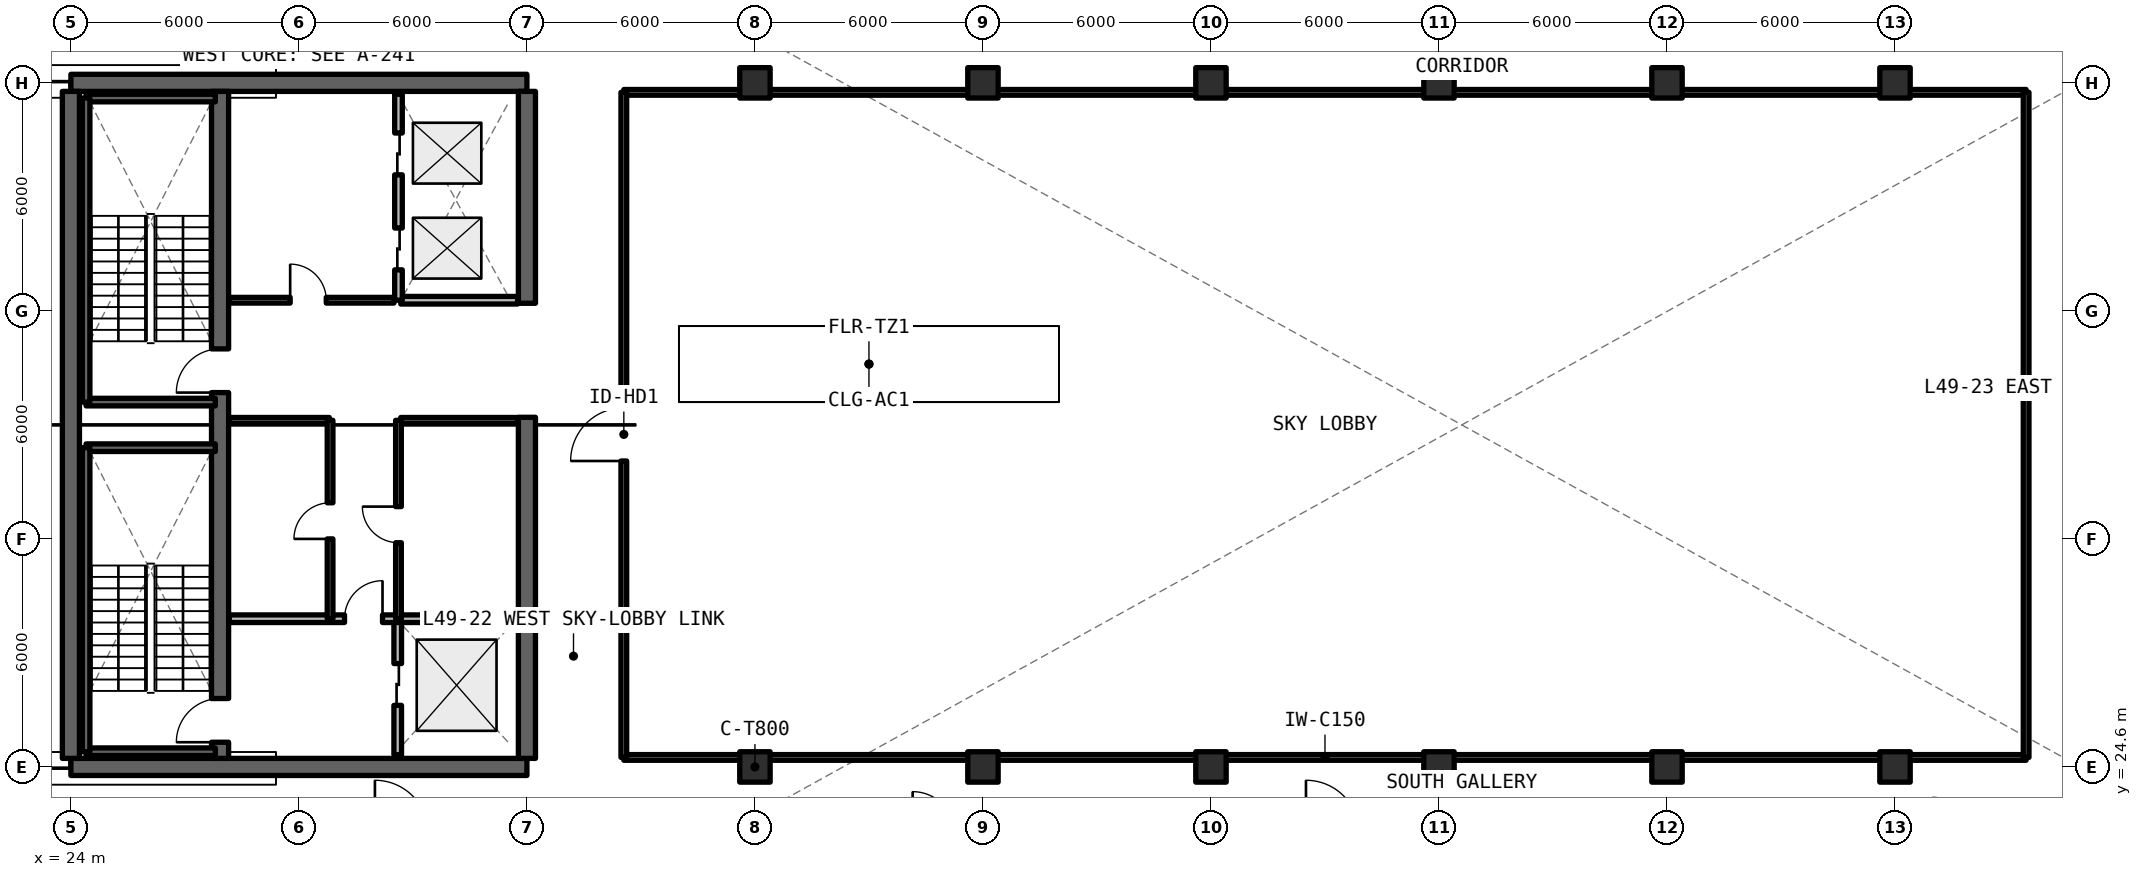
"""IFC4 building model, lengths in metres.
Left out: names, types, materials, properties, quantities, classifications, styles, units other than length and angle.
Written with IfcOpenShell. Run it as: python <this file> out.ifc"""

import sys

from ifc_helpers import new_model, si_unit, direction, frame, frame_2d, origin, origin_2d, place, context, subcontext, project, spatial, rectangle, extrude, element, fill, save


model = new_model("IFC4")
c1 = context("Model", 3, precision=1e-05, world=origin(), true_north=direction((0.0, 1.0)))
c2 = subcontext(c1, "Body", "Model", "MODEL_VIEW")
j1 = project(units=[si_unit("LENGTHUNIT", "METRE"), si_unit("PLANEANGLEUNIT", "RADIAN")], contexts=[c1])
p1 = place(None, origin())
s1 = spatial("IfcSite", under=j1, at=p1, CompositionType="ELEMENT")
p2 = place(p1, origin())
s2 = spatial("IfcBuilding", under=s1, at=p2, CompositionType="ELEMENT")
p3 = place(p2, frame((0.0, 0.0, 177.87)))
s3 = spatial("IfcBuildingStorey", under=s2, at=p3, CompositionType="ELEMENT", Elevation=177.87)
for number, where, z_axis, x_axis in (
    (1, (24.0, 24.6, 0.0), (0.0, 0.0, 1.0), (1.0, 0.0, 0.0)),
    (2, (36.0, 42.6, 0.0), (0.0, 0.0, 1.0), (-1.0, 0.0, 0.0)),
):
    element("IfcWall", number, at=place(p3, frame(where, z_axis=z_axis, x_axis=x_axis)), inside=s3, PredefinedType="SHEAR", context=c2, shape_type="SweptSolid", body=[
        extrude(rectangle(XDim=12.0, YDim=0.45, at=frame_2d((6.0, 0.0))), origin(), (0.0, 0.0, 1.0), 3.96),
    ])
p4 = place(p3, frame((24.0, 24.825, 0.0), z_axis=(0.0, 0.0, 1.0), x_axis=(0.0, 1.0, 0.0)))
e3 = element("IfcWall", 3, at=p4, inside=s3, PredefinedType="SHEAR", context=c2, shape_type="SweptSolid", body=[
    extrude(rectangle(XDim=17.55, YDim=0.45, at=frame_2d((8.775, 0.0))), origin(), (0.0, 0.0, 1.0), 3.96),
])
p5 = place(p3, frame((36.0, 24.825, 0.0), z_axis=(0.0, 0.0, 1.0), x_axis=(0.0, 1.0, 0.0)))
e4 = element("IfcWall", 4, at=p5, inside=s3, PredefinedType="SHEAR", context=c2, shape_type="SweptSolid", body=[
    extrude(rectangle(XDim=8.975, YDim=0.45, at=frame_2d((4.488, 0.0))), origin(), (0.0, 0.0, 1.0), 3.96),
])
p6 = place(p3, frame((36.0, 36.8, 0.0), z_axis=(0.0, 0.0, 1.0), x_axis=(0.0, 1.0, 0.0)))
e5 = element("IfcWall", 5, at=p6, inside=s3, PredefinedType="SHEAR", context=c2, shape_type="SweptSolid", body=[
    extrude(rectangle(XDim=5.575, YDim=0.45, at=frame_2d((2.788, 0.0))), origin(), (0.0, 0.0, 1.0), 3.96),
])
p7 = place(p3, frame((27.925, 24.825, 0.0), z_axis=(0.0, 0.0, 1.0), x_axis=(0.0, 1.0, 0.0)))
e6 = element("IfcWall", 6, at=p7, inside=s3, PredefinedType="SHEAR", context=c2, shape_type="SweptSolid", body=[
    extrude(rectangle(XDim=17.55, YDim=0.45, at=frame_2d((8.775, 0.0))), origin(), (0.0, 0.0, 1.0), 3.96),
])
p8 = place(p7, frame((0.425, 0.0, 0.0)))
e7 = element("IfcOpeningElement", 7, at=p8, cuts=e6, PredefinedType="OPENING", context=c2, shape_type="SweptSolid", body=[
    extrude(rectangle(XDim=1.15, YDim=2.15, at=frame_2d((0.575, 1.075))), frame((0.0, 0.235, 0.0), z_axis=(0.0, -1.0, 0.0), x_axis=(1.0, 0.0, 0.0)), (0.0, 0.0, 1.0), 0.47),
])
p9 = place(p7, frame((9.625, 0.0, 0.0)))
e8 = element("IfcOpeningElement", 8, at=p9, cuts=e6, PredefinedType="OPENING", context=c2, shape_type="SweptSolid", body=[
    extrude(rectangle(XDim=1.15, YDim=2.15, at=frame_2d((0.575, 1.075))), frame((0.0, 0.235, 0.0), z_axis=(0.0, -1.0, 0.0), x_axis=(1.0, 0.0, 0.0)), (0.0, 0.0, 1.0), 0.47),
])
for number, where, z_axis, x_axis in (
    (9, (42.0, 24.6, 0.0), (0.0, 0.0, 1.0), (1.0, 0.0, 0.0)),
    (10, (42.0, 42.6, 0.0), (0.0, 0.0, 1.0), (1.0, 0.0, 0.0)),
    (11, (48.0, 24.6, 0.0), (0.0, 0.0, 1.0), (1.0, 0.0, 0.0)),
    (12, (48.0, 42.6, 0.0), (0.0, 0.0, 1.0), (1.0, 0.0, 0.0)),
    (13, (54.0, 24.6, 0.0), (0.0, 0.0, 1.0), (1.0, 0.0, 0.0)),
    (14, (54.0, 42.6, 0.0), (0.0, 0.0, 1.0), (1.0, 0.0, 0.0)),
    (15, (60.0, 24.6, 0.0), (0.0, 0.0, 1.0), (1.0, 0.0, 0.0)),
    (16, (60.0, 42.6, 0.0), (0.0, 0.0, 1.0), (1.0, 0.0, 0.0)),
    (17, (66.0, 24.6, 0.0), (0.0, 0.0, 1.0), (1.0, 0.0, 0.0)),
    (18, (66.0, 42.6, 0.0), (0.0, 0.0, 1.0), (1.0, 0.0, 0.0)),
    (19, (72.0, 24.6, 0.0), (0.0, 0.0, 1.0), (1.0, 0.0, 0.0)),
    (20, (72.0, 42.6, 0.0), (0.0, 0.0, 1.0), (1.0, 0.0, 0.0)),
):
    element("IfcColumn", number, at=place(p3, frame(where, z_axis=z_axis, x_axis=x_axis)), inside=s3, PredefinedType="COLUMN", context=c2, shape_type="SweptSolid", body=[
        extrude(rectangle(XDim=0.8, YDim=0.8, at=origin_2d()), origin(), (0.0, 0.0, 1.0), 3.96),
    ])
p10 = place(p3, frame((32.6, 24.92, 0.0), z_axis=(0.0, 0.0, 1.0), x_axis=(0.0, 1.0, 0.0)))
e21 = element("IfcWall", 21, at=p10, inside=s3, PredefinedType="SOLIDWALL", context=c2, shape_type="SweptSolid", body=[
    extrude(rectangle(XDim=3.58, YDim=0.2, at=frame_2d((1.79, 0.0))), origin(), (0.0, 0.0, 1.0), 2.96),
])
p11 = place(p10, frame((1.3, 0.0, 0.0)))
e22 = element("IfcOpeningElement", 22, at=p11, cuts=e21, PredefinedType="OPENING", context=c2, shape_type="SweptSolid", body=[
    extrude(rectangle(XDim=1.1, YDim=2.2, at=frame_2d((0.55, 1.1))), frame((0.0, 0.11, 0.0), z_axis=(0.0, -1.0, 0.0), x_axis=(1.0, 0.0, 0.0)), (0.0, 0.0, 1.0), 0.22),
])
p12 = place(p3, frame((28.17, 28.5, 0.0), z_axis=(0.0, 0.0, 1.0), x_axis=(1.0, 0.0, 0.0)))
e23 = element("IfcWall", 23, at=p12, inside=s3, PredefinedType="SOLIDWALL", context=c2, shape_type="SweptSolid", body=[
    extrude(rectangle(XDim=7.585, YDim=0.2, at=frame_2d((3.792, 0.0))), origin(), (0.0, 0.0, 1.0), 2.96),
])
p13 = place(p12, frame((3.03, 0.0, 0.0)))
e24 = element("IfcOpeningElement", 24, at=p13, cuts=e23, PredefinedType="OPENING", context=c2, shape_type="SweptSolid", body=[
    extrude(rectangle(XDim=1.0, YDim=2.15, at=frame_2d((0.5, 1.075))), frame((0.0, 0.11, 0.0), z_axis=(0.0, -1.0, 0.0), x_axis=(1.0, 0.0, 0.0)), (0.0, 0.0, 1.0), 0.22),
])
p14 = place(p3, frame((28.17, 33.72, 0.0), z_axis=(0.0, 0.0, 1.0), x_axis=(1.0, 0.0, 0.0)))
e25 = element("IfcWall", 25, at=p14, inside=s3, PredefinedType="SOLIDWALL", context=c2, shape_type="SweptSolid", body=[
    extrude(rectangle(XDim=2.63, YDim=0.15, at=frame_2d((1.315, 0.0))), origin(), (0.0, 0.0, 1.0), 2.96),
])
p15 = place(p3, frame((30.82, 28.5, 0.0), z_axis=(0.0, 0.0, 1.0), x_axis=(0.0, 1.0, 0.0)))
e26 = element("IfcWall", 26, at=p15, inside=s3, PredefinedType="SOLIDWALL", context=c2, shape_type="SweptSolid", body=[
    extrude(rectangle(XDim=5.22, YDim=0.15, at=frame_2d((2.61, 0.0))), origin(), (0.0, 0.0, 1.0), 2.96),
])
p16 = place(p15, frame((2.1, 0.0, 0.0)))
e27 = element("IfcOpeningElement", 27, at=p16, cuts=e26, PredefinedType="OPENING", context=c2, shape_type="SweptSolid", body=[
    extrude(rectangle(XDim=0.95, YDim=2.15, at=frame_2d((0.475, 1.075))), frame((0.0, 0.085, 0.0), z_axis=(0.0, -1.0, 0.0), x_axis=(1.0, 0.0, 0.0)), (0.0, 0.0, 1.0), 0.17),
])
p17 = place(p3, frame((32.68, 33.72, 0.0), z_axis=(0.0, 0.0, 1.0), x_axis=(1.0, 0.0, 0.0)))
e28 = element("IfcWall", 28, at=p17, inside=s3, PredefinedType="SOLIDWALL", context=c2, shape_type="SweptSolid", body=[
    extrude(rectangle(XDim=3.075, YDim=0.15, at=frame_2d((1.538, 0.0))), origin(), (0.0, 0.0, 1.0), 2.96),
])
p18 = place(p3, frame((32.62, 28.5, 0.0), z_axis=(0.0, 0.0, 1.0), x_axis=(0.0, 1.0, 0.0)))
e29 = element("IfcWall", 29, at=p18, inside=s3, PredefinedType="SOLIDWALL", context=c2, shape_type="SweptSolid", body=[
    extrude(rectangle(XDim=5.22, YDim=0.15, at=frame_2d((2.61, 0.0))), origin(), (0.0, 0.0, 1.0), 2.96),
])
p19 = place(p18, frame((2.0, 0.0, 0.0)))
e30 = element("IfcOpeningElement", 30, at=p19, cuts=e29, PredefinedType="OPENING", context=c2, shape_type="SweptSolid", body=[
    extrude(rectangle(XDim=0.95, YDim=2.15, at=frame_2d((0.475, 1.075))), frame((0.0, 0.085, 0.0), z_axis=(0.0, -1.0, 0.0), x_axis=(1.0, 0.0, 0.0)), (0.0, 0.0, 1.0), 0.17),
])
p20 = place(p3, frame((28.17, 36.88, 0.0), z_axis=(0.0, 0.0, 1.0), x_axis=(1.0, 0.0, 0.0)))
e31 = element("IfcWall", 31, at=p20, inside=s3, PredefinedType="SOLIDWALL", context=c2, shape_type="SweptSolid", body=[
    extrude(rectangle(XDim=4.33, YDim=0.15, at=frame_2d((2.165, 0.0))), origin(), (0.0, 0.0, 1.0), 2.96),
])
p21 = place(p20, frame((1.6, 0.0, 0.0)))
e32 = element("IfcOpeningElement", 32, at=p21, cuts=e31, PredefinedType="OPENING", context=c2, shape_type="SweptSolid", body=[
    extrude(rectangle(XDim=0.95, YDim=2.15, at=frame_2d((0.475, 1.075))), frame((0.0, 0.085, 0.0), z_axis=(0.0, -1.0, 0.0), x_axis=(1.0, 0.0, 0.0)), (0.0, 0.0, 1.0), 0.17),
])
p22 = place(p3, frame((32.68, 36.88, 0.0), z_axis=(0.0, 0.0, 1.0), x_axis=(1.0, 0.0, 0.0)))
e33 = element("IfcWall", 33, at=p22, inside=s3, PredefinedType="SOLIDWALL", context=c2, shape_type="SweptSolid", body=[
    extrude(rectangle(XDim=3.075, YDim=0.2, at=frame_2d((1.538, 0.0))), origin(), (0.0, 0.0, 1.0), 2.96),
])
p23 = place(p3, frame((32.62, 36.88, 0.0), z_axis=(0.0, 0.0, 1.0), x_axis=(0.0, 1.0, 0.0)))
e34 = element("IfcWall", 34, at=p23, inside=s3, PredefinedType="SOLIDWALL", context=c2, shape_type="SweptSolid", body=[
    extrude(rectangle(XDim=5.42, YDim=0.2, at=frame_2d((2.71, 0.0))), origin(), (0.0, 0.0, 1.0), 2.96),
])
p24 = place(p23, frame((0.8, 0.0, 0.0)))
e35 = element("IfcOpeningElement", 35, at=p24, cuts=e34, PredefinedType="OPENING", context=c2, shape_type="SweptSolid", body=[
    extrude(rectangle(XDim=1.1, YDim=2.2, at=frame_2d((0.55, 1.1))), frame((0.0, 0.11, 0.0), z_axis=(0.0, -1.0, 0.0), x_axis=(1.0, 0.0, 0.0)), (0.0, 0.0, 1.0), 0.22),
])
p25 = place(p23, frame((3.3, 0.0, 0.0)))
e36 = element("IfcOpeningElement", 36, at=p25, cuts=e34, PredefinedType="OPENING", context=c2, shape_type="SweptSolid", body=[
    extrude(rectangle(XDim=1.1, YDim=2.2, at=frame_2d((0.55, 1.1))), frame((0.0, 0.11, 0.0), z_axis=(0.0, -1.0, 0.0), x_axis=(1.0, 0.0, 0.0)), (0.0, 0.0, 1.0), 0.22),
])
for number, where, z_axis, x_axis in (
    (37, (38.55, 24.85, 0.0), (0.0, 0.0, 1.0), (1.0, 0.0, 0.0)),
    (38, (38.55, 42.35, 0.0), (0.0, 0.0, 1.0), (1.0, 0.0, 0.0)),
):
    element("IfcWall", number, at=place(p3, frame(where, z_axis=z_axis, x_axis=x_axis)), inside=s3, PredefinedType="SOLIDWALL", context=c2, shape_type="SweptSolid", body=[
        extrude(rectangle(XDim=36.9, YDim=0.15, at=frame_2d((18.45, 0.0))), origin(), (0.0, 0.0, 1.0), 2.96),
    ])
p26 = place(p3, frame((38.55, 24.85, 0.0), z_axis=(0.0, 0.0, 1.0), x_axis=(0.0, 1.0, 0.0)))
e39 = element("IfcWall", 39, at=p26, inside=s3, PredefinedType="SOLIDWALL", context=c2, shape_type="SweptSolid", body=[
    extrude(rectangle(XDim=17.5, YDim=0.15, at=frame_2d((8.75, 0.0))), origin(), (0.0, 0.0, 1.0), 2.96),
])
p27 = place(p26, frame((7.8, 0.0, 0.0)))
e40 = element("IfcOpeningElement", 40, at=p27, cuts=e39, PredefinedType="OPENING", context=c2, shape_type="SweptSolid", body=[
    extrude(rectangle(XDim=1.4, YDim=2.15, at=frame_2d((0.7, 1.075))), frame((0.0, 0.085, 0.0), z_axis=(0.0, -1.0, 0.0), x_axis=(1.0, 0.0, 0.0)), (0.0, 0.0, 1.0), 0.17),
])
p28 = place(p3, frame((75.45, 24.85, 0.0), z_axis=(0.0, 0.0, 1.0), x_axis=(0.0, 1.0, 0.0)))
e41 = element("IfcWall", 41, at=p28, inside=s3, PredefinedType="SOLIDWALL", context=c2, shape_type="SweptSolid", body=[
    extrude(rectangle(XDim=17.5, YDim=0.15, at=frame_2d((8.75, 0.0))), origin(), (0.0, 0.0, 1.0), 2.96),
])
for number, where, z_axis, x_axis in (
    (42, (24.4, 25.0, 0.0), (0.0, 0.0, 1.0), (1.0, 0.0, 0.0)),
    (43, (27.8, 33.0, 0.0), (0.0, 0.0, 1.0), (-1.0, 0.0, 0.0)),
):
    element("IfcWall", number, at=place(p3, frame(where, z_axis=z_axis, x_axis=x_axis)), inside=s3, PredefinedType="SOLIDWALL", context=c2, shape_type="SweptSolid", body=[
        extrude(rectangle(XDim=3.4, YDim=0.2, at=frame_2d((1.7, 0.0))), origin(), (0.0, 0.0, 1.0), 3.96),
    ])
p29 = place(p3, frame((24.4, 33.0, 0.0), z_axis=(0.0, 0.0, 1.0), x_axis=(0.0, -1.0, 0.0)))
e44 = element("IfcWall", 44, at=p29, inside=s3, PredefinedType="SOLIDWALL", context=c2, shape_type="SweptSolid", body=[
    extrude(rectangle(XDim=8.0, YDim=0.2, at=frame_2d((4.0, 0.0))), origin(), (0.0, 0.0, 1.0), 3.96),
])
for number, where, z_axis, x_axis in (
    (45, (24.4, 34.2, 0.0), (0.0, 0.0, 1.0), (1.0, 0.0, 0.0)),
    (46, (27.8, 42.2, 0.0), (0.0, 0.0, 1.0), (-1.0, 0.0, 0.0)),
):
    element("IfcWall", number, at=place(p3, frame(where, z_axis=z_axis, x_axis=x_axis)), inside=s3, PredefinedType="SOLIDWALL", context=c2, shape_type="SweptSolid", body=[
        extrude(rectangle(XDim=3.4, YDim=0.2, at=frame_2d((1.7, 0.0))), origin(), (0.0, 0.0, 1.0), 3.96),
    ])
p30 = place(p3, frame((24.4, 42.2, 0.0), z_axis=(0.0, 0.0, 1.0), x_axis=(0.0, -1.0, 0.0)))
e47 = element("IfcWall", 47, at=p30, inside=s3, PredefinedType="SOLIDWALL", context=c2, shape_type="SweptSolid", body=[
    extrude(rectangle(XDim=8.0, YDim=0.2, at=frame_2d((4.0, 0.0))), origin(), (0.0, 0.0, 1.0), 3.96),
])
p31 = place(p11, origin())
e48 = element("IfcDoor", 48, at=p31, inside=s3, OperationType="SLIDING_TO_LEFT", PredefinedType="DOOR", context=c2, shape_type="SweptSolid", body=[
    extrude(rectangle(XDim=1.1, YDim=2.2, at=frame_2d((0.55, 1.1))), frame((0.0, 0.025, 0.0), z_axis=(0.0, -1.0, 0.0), x_axis=(1.0, 0.0, 0.0)), (0.0, 0.0, 1.0), 0.05),
])
fill(e22, e48)
p32 = place(p13, origin())
e49 = element("IfcDoor", 49, at=p32, inside=s3, OperationType="SINGLE_SWING_RIGHT", PredefinedType="DOOR", context=c2, shape_type="SweptSolid", body=[
    extrude(rectangle(XDim=1.0, YDim=2.15, at=frame_2d((0.5, 1.075))), frame((0.0, 0.025, 0.0), z_axis=(0.0, -1.0, 0.0), x_axis=(1.0, 0.0, 0.0)), (0.0, 0.0, 1.0), 0.05),
])
fill(e24, e49)
p33 = place(p16, origin())
e50 = element("IfcDoor", 50, at=p33, inside=s3, OperationType="SINGLE_SWING_LEFT", PredefinedType="DOOR", context=c2, shape_type="SweptSolid", body=[
    extrude(rectangle(XDim=0.95, YDim=2.15, at=frame_2d((0.475, 1.075))), frame((0.0, 0.025, 0.0), z_axis=(0.0, -1.0, 0.0), x_axis=(1.0, 0.0, 0.0)), (0.0, 0.0, 1.0), 0.05),
])
fill(e27, e50)
p34 = place(p19, origin())
e51 = element("IfcDoor", 51, at=p34, inside=s3, OperationType="SINGLE_SWING_RIGHT", PredefinedType="DOOR", context=c2, shape_type="SweptSolid", body=[
    extrude(rectangle(XDim=0.95, YDim=2.15, at=frame_2d((0.475, 1.075))), frame((0.0, 0.025, 0.0), z_axis=(0.0, -1.0, 0.0), x_axis=(1.0, 0.0, 0.0)), (0.0, 0.0, 1.0), 0.05),
])
fill(e30, e51)
p35 = place(p21, origin())
e52 = element("IfcDoor", 52, at=p35, inside=s3, OperationType="SINGLE_SWING_LEFT", PredefinedType="DOOR", context=c2, shape_type="SweptSolid", body=[
    extrude(rectangle(XDim=0.95, YDim=2.15, at=frame_2d((0.475, 1.075))), frame((0.0, 0.025, 0.0), z_axis=(0.0, -1.0, 0.0), x_axis=(1.0, 0.0, 0.0)), (0.0, 0.0, 1.0), 0.05),
])
fill(e32, e52)
p36 = place(p24, origin())
e53 = element("IfcDoor", 53, at=p36, inside=s3, OperationType="SLIDING_TO_LEFT", PredefinedType="DOOR", context=c2, shape_type="SweptSolid", body=[
    extrude(rectangle(XDim=1.1, YDim=2.2, at=frame_2d((0.55, 1.1))), frame((0.0, 0.025, 0.0), z_axis=(0.0, -1.0, 0.0), x_axis=(1.0, 0.0, 0.0)), (0.0, 0.0, 1.0), 0.05),
])
fill(e35, e53)
p37 = place(p25, origin())
e54 = element("IfcDoor", 54, at=p37, inside=s3, OperationType="SLIDING_TO_RIGHT", PredefinedType="DOOR", context=c2, shape_type="SweptSolid", body=[
    extrude(rectangle(XDim=1.1, YDim=2.2, at=frame_2d((0.55, 1.1))), frame((0.0, 0.025, 0.0), z_axis=(0.0, -1.0, 0.0), x_axis=(1.0, 0.0, 0.0)), (0.0, 0.0, 1.0), 0.05),
])
fill(e36, e54)
p38 = place(p27, origin())
e55 = element("IfcDoor", 55, at=p38, inside=s3, OperationType="SINGLE_SWING_LEFT", PredefinedType="DOOR", context=c2, shape_type="SweptSolid", body=[
    extrude(rectangle(XDim=1.4, YDim=2.15, at=frame_2d((0.7, 1.075))), frame((0.0, 0.025, 0.0), z_axis=(0.0, -1.0, 0.0), x_axis=(1.0, 0.0, 0.0)), (0.0, 0.0, 1.0), 0.05),
])
fill(e40, e55)
p39 = place(p8, origin())
e56 = element("IfcDoor", 56, at=p39, inside=s3, OperationType="SINGLE_SWING_LEFT", PredefinedType="DOOR", context=c2, shape_type="SweptSolid", body=[
    extrude(rectangle(XDim=1.15, YDim=2.15, at=frame_2d((0.575, 1.075))), frame((0.0, 0.025, 0.0), z_axis=(0.0, -1.0, 0.0), x_axis=(1.0, 0.0, 0.0)), (0.0, 0.0, 1.0), 0.05),
])
fill(e7, e56)
p40 = place(p9, origin())
e57 = element("IfcDoor", 57, at=p40, inside=s3, OperationType="SINGLE_SWING_RIGHT", PredefinedType="DOOR", context=c2, shape_type="SweptSolid", body=[
    extrude(rectangle(XDim=1.15, YDim=2.15, at=frame_2d((0.575, 1.075))), frame((0.0, 0.025, 0.0), z_axis=(0.0, -1.0, 0.0), x_axis=(1.0, 0.0, 0.0)), (0.0, 0.0, 1.0), 0.05),
])
fill(e8, e57)
save(model, sys.argv[1])
